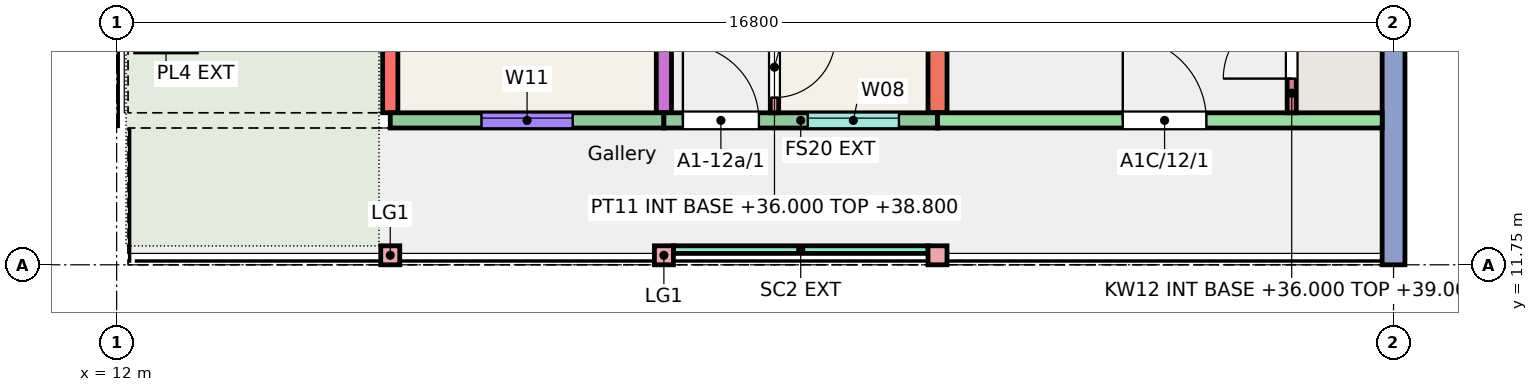
"""IFC4 building model, lengths in metres.
Left out: names, types, materials, properties, quantities, classifications, styles, units other than length and angle.
Written with IfcOpenShell. Run it as: python <this file> out.ifc"""

import sys

from ifc_helpers import new_model, si_unit, direction, frame, frame_2d, origin, origin_2d, place, context, subcontext, project, spatial, rectangle, extrude, element, fill, save


model = new_model("IFC4")
c1 = context("Model", 3, precision=1e-05, world=origin(), true_north=direction((0.0, 1.0)))
c2 = subcontext(c1, "Body", "Model", "MODEL_VIEW")
j1 = project(units=[si_unit("LENGTHUNIT", "METRE"), si_unit("PLANEANGLEUNIT", "RADIAN")], contexts=[c1])
p1 = place(None, origin())
s1 = spatial("IfcSite", under=j1, at=p1, CompositionType="ELEMENT")
p2 = place(p1, origin())
s2 = spatial("IfcBuilding", under=s1, at=p2, CompositionType="ELEMENT")
p3 = place(p2, frame((0.0, 0.0, 36.0)))
s3 = spatial("IfcBuildingStorey", under=s2, at=p3, CompositionType="ELEMENT", Elevation=36.0)
p4 = place(p3, frame((15.6, 13.75, 0.0), z_axis=(0.0, 0.0, 1.0), x_axis=(0.0, 1.0, 0.0)))
e1 = element("IfcWall", 1, at=p4, inside=s3, PredefinedType="SHEAR", context=c2, shape_type="SweptSolid", body=[
    extrude(rectangle(XDim=9.0, YDim=0.2, at=frame_2d((4.5, 0.0))), origin(), (0.0, 0.0, 1.0), 3.0),
])
p5 = place(p4, frame((1.45, 0.0, 0.9)))
e2 = element("IfcOpeningElement", 2, at=p5, cuts=e1, PredefinedType="OPENING", context=c2, shape_type="SweptSolid", body=[
    extrude(rectangle(XDim=1.5, YDim=1.5, at=frame_2d((0.75, 0.75))), frame((0.0, 0.11, 0.0), z_axis=(0.0, -1.0, 0.0), x_axis=(1.0, 0.0, 0.0)), (0.0, 0.0, 1.0), 0.22),
])
p6 = place(p4, frame((7.577, 0.0, 0.9)))
e3 = element("IfcOpeningElement", 3, at=p6, cuts=e1, PredefinedType="OPENING", context=c2, shape_type="SweptSolid", body=[
    extrude(rectangle(XDim=1.2, YDim=1.5, at=frame_2d((0.6, 0.75))), frame((0.0, 0.11, 0.0), z_axis=(0.0, -1.0, 0.0), x_axis=(1.0, 0.0, 0.0)), (0.0, 0.0, 1.0), 0.22),
])
p7 = place(p4, frame((6.255, 0.0, 0.0)))
e4 = element("IfcOpeningElement", 4, at=p7, cuts=e1, PredefinedType="OPENING", context=c2, shape_type="SweptSolid", body=[
    extrude(rectangle(XDim=1.0, YDim=2.1, at=frame_2d((0.5, 1.05))), frame((0.0, 0.11, 0.0), z_axis=(0.0, -1.0, 0.0), x_axis=(1.0, 0.0, 0.0)), (0.0, 0.0, 1.0), 0.22),
])
p8 = place(p3, frame((19.2, 13.75, 0.0), z_axis=(0.0, 0.0, 1.0), x_axis=(0.0, 1.0, 0.0)))
e5 = element("IfcWall", 5, at=p8, inside=s3, PredefinedType="SHEAR", context=c2, shape_type="SweptSolid", body=[
    extrude(rectangle(XDim=9.0, YDim=0.2, at=frame_2d((4.5, 0.0))), origin(), (0.0, 0.0, 1.0), 3.0),
])
p9 = place(p8, frame((2.4, 0.0, 0.0)))
e6 = element("IfcOpeningElement", 6, at=p9, cuts=e5, PredefinedType="OPENING", context=c2, shape_type="SweptSolid", body=[
    extrude(rectangle(XDim=1.2, YDim=2.1, at=frame_2d((0.6, 1.05))), frame((0.0, 0.11, 0.0), z_axis=(0.0, -1.0, 0.0), x_axis=(1.0, 0.0, 0.0)), (0.0, 0.0, 1.0), 0.22),
])
p10 = place(p8, frame((6.4, 0.0, 0.0)))
e7 = element("IfcOpeningElement", 7, at=p10, cuts=e5, PredefinedType="OPENING", context=c2, shape_type="SweptSolid", body=[
    extrude(rectangle(XDim=1.2, YDim=2.1, at=frame_2d((0.6, 1.05))), frame((0.0, 0.11, 0.0), z_axis=(0.0, -1.0, 0.0), x_axis=(1.0, 0.0, 0.0)), (0.0, 0.0, 1.0), 0.22),
])
p11 = place(p3, frame((22.8, 13.75, 0.0), z_axis=(0.0, 0.0, 1.0), x_axis=(0.0, 1.0, 0.0)))
e8 = element("IfcWall", 8, at=p11, inside=s3, PredefinedType="SHEAR", context=c2, shape_type="SweptSolid", body=[
    extrude(rectangle(XDim=9.0, YDim=0.25, at=frame_2d((4.5, 0.0))), origin(), (0.0, 0.0, 1.0), 3.0),
])
p12 = place(p3, frame((28.8, 11.75, 0.0), z_axis=(0.0, 0.0, 1.0), x_axis=(0.0, 1.0, 0.0)))
e9 = element("IfcWall", 9, at=p12, inside=s3, PredefinedType="SHEAR", context=c2, shape_type="SweptSolid", body=[
    extrude(rectangle(XDim=11.0, YDim=0.3, at=frame_2d((5.5, 0.0))), origin(), (0.0, 0.0, 1.0), 3.0),
])
p13 = place(p3, frame((15.6, 13.65, 0.0), z_axis=(0.0, 0.0, 1.0), x_axis=(1.0, 0.0, 0.0)))
e10 = element("IfcWall", 10, at=p13, inside=s3, PredefinedType="SOLIDWALL", context=c2, shape_type="SweptSolid", body=[
    extrude(rectangle(XDim=3.6, YDim=0.2, at=frame_2d((1.8, 0.0))), origin(), (0.0, 0.0, 1.0), 3.0),
])
p14 = place(p13, frame((1.2, 0.0, 0.8)))
e11 = element("IfcOpeningElement", 11, at=p14, cuts=e10, PredefinedType="OPENING", context=c2, shape_type="SweptSolid", body=[
    extrude(rectangle(XDim=1.2, YDim=1.6, at=frame_2d((0.6, 0.8))), frame((0.0, 0.11, 0.0), z_axis=(0.0, -1.0, 0.0), x_axis=(1.0, 0.0, 0.0)), (0.0, 0.0, 1.0), 0.22),
])
p15 = place(p3, frame((19.2, 13.65, 0.0), z_axis=(0.0, 0.0, 1.0), x_axis=(1.0, 0.0, 0.0)))
e12 = element("IfcWall", 12, at=p15, inside=s3, PredefinedType="SOLIDWALL", context=c2, shape_type="SweptSolid", body=[
    extrude(rectangle(XDim=3.6, YDim=0.2, at=frame_2d((1.8, 0.0))), origin(), (0.0, 0.0, 1.0), 3.0),
])
p16 = place(p15, frame((1.893, 0.0, 1.1)))
e13 = element("IfcOpeningElement", 13, at=p16, cuts=e12, PredefinedType="OPENING", context=c2, shape_type="SweptSolid", body=[
    extrude(rectangle(XDim=1.2, YDim=1.3, at=frame_2d((0.6, 0.65))), frame((0.0, 0.11, 0.0), z_axis=(0.0, -1.0, 0.0), x_axis=(1.0, 0.0, 0.0)), (0.0, 0.0, 1.0), 0.22),
])
p17 = place(p15, frame((0.25, 0.0, 0.0)))
e14 = element("IfcOpeningElement", 14, at=p17, cuts=e12, PredefinedType="OPENING", context=c2, shape_type="SweptSolid", body=[
    extrude(rectangle(XDim=1.0, YDim=2.1, at=frame_2d((0.5, 1.05))), frame((0.0, 0.11, 0.0), z_axis=(0.0, -1.0, 0.0), x_axis=(1.0, 0.0, 0.0)), (0.0, 0.0, 1.0), 0.22),
])
p18 = place(p3, frame((22.8, 13.65, 0.0), z_axis=(0.0, 0.0, 1.0), x_axis=(1.0, 0.0, 0.0)))
e15 = element("IfcWall", 15, at=p18, inside=s3, PredefinedType="SHEAR", context=c2, shape_type="SweptSolid", body=[
    extrude(rectangle(XDim=5.85, YDim=0.2, at=frame_2d((2.925, 0.0))), origin(), (0.0, 0.0, 1.0), 3.0),
])
p19 = place(p18, frame((2.438, 0.0, 0.0)))
e16 = element("IfcOpeningElement", 16, at=p19, cuts=e15, PredefinedType="OPENING", context=c2, shape_type="SweptSolid", body=[
    extrude(rectangle(XDim=1.1, YDim=2.1, at=frame_2d((0.55, 1.05))), frame((0.0, 0.11, 0.0), z_axis=(0.0, -1.0, 0.0), x_axis=(1.0, 0.0, 0.0)), (0.0, 0.0, 1.0), 0.22),
])
p20 = place(p3, frame((27.46, 13.75, 0.0), z_axis=(0.0, 0.0, 1.0), x_axis=(0.0, 1.0, 0.0)))
e17 = element("IfcWall", 17, at=p20, inside=s3, PredefinedType="SHEAR", context=c2, shape_type="SweptSolid", body=[
    extrude(rectangle(XDim=1.72, YDim=0.12, at=frame_2d((0.86, 0.0))), origin(), (0.0, 0.0, 1.0), 3.0),
])
p21 = place(p20, frame((0.45, 0.0, 0.0)))
e18 = element("IfcOpeningElement", 18, at=p21, cuts=e17, PredefinedType="OPENING", context=c2, shape_type="SweptSolid", body=[
    extrude(rectangle(XDim=0.9, YDim=2.1, at=frame_2d((0.45, 1.05))), frame((0.0, 0.07, 0.0), z_axis=(0.0, -1.0, 0.0), x_axis=(1.0, 0.0, 0.0)), (0.0, 0.0, 1.0), 0.14),
])
for number, where, z_axis, x_axis in (
    (19, (15.6, 11.875, 0.0), (0.0, 0.0, 1.0), (1.0, 0.0, 0.0)),
    (20, (19.2, 11.875, 0.0), (0.0, 0.0, 1.0), (1.0, 0.0, 0.0)),
    (21, (22.8, 11.875, 0.0), (0.0, 0.0, 1.0), (1.0, 0.0, 0.0)),
):
    element("IfcColumn", number, at=place(p3, frame(where, z_axis=z_axis, x_axis=x_axis)), inside=s3, PredefinedType="COLUMN", context=c2, shape_type="SweptSolid", body=[
        extrude(rectangle(XDim=0.25, YDim=0.25, at=origin_2d()), origin(), (0.0, 0.0, 1.0), 3.0),
    ])
p22 = place(p3, frame((12.25, 14.65, 0.01), z_axis=(0.0, 0.0, 1.0), x_axis=(1.0, 0.0, 0.0)))
e22 = element("IfcWall", 22, at=p22, inside=s3, PredefinedType="SOLIDWALL", context=c2, shape_type="SweptSolid", body=[
    extrude(rectangle(XDim=0.8, YDim=0.2, at=frame_2d((0.4, 0.0))), origin(), (0.0, 0.0, 1.0), 0.45),
])
p23 = place(p3, frame((19.325, 11.95, 0.0), z_axis=(0.0, 0.0, 1.0), x_axis=(1.0, 0.0, 0.0)))
e23 = element("IfcWall", 23, at=p23, inside=s3, PredefinedType="SOLIDWALL", context=c2, shape_type="SweptSolid", body=[
    extrude(rectangle(XDim=3.35, YDim=0.1, at=frame_2d((1.675, 0.0))), origin(), (0.0, 0.0, 1.0), 2.45),
])
p24 = place(p3, frame((20.655, 13.75, 0.0), z_axis=(0.0, 0.0, 1.0), x_axis=(0.0, 1.0, 0.0)))
e24 = element("IfcWall", 24, at=p24, inside=s3, PredefinedType="PARTITIONING", context=c2, shape_type="SweptSolid", body=[
    extrude(rectangle(XDim=4.5, YDim=0.11, at=frame_2d((2.25, 0.0))), origin(), (0.0, 0.0, 1.0), 2.8),
])
p25 = place(p24, frame((0.2, 0.0, 0.0)))
e25 = element("IfcOpeningElement", 25, at=p25, cuts=e24, PredefinedType="OPENING", context=c2, shape_type="SweptSolid", body=[
    extrude(rectangle(XDim=0.8, YDim=2.1, at=frame_2d((0.4, 1.05))), frame((0.0, 0.065, 0.0), z_axis=(0.0, -1.0, 0.0), x_axis=(1.0, 0.0, 0.0)), (0.0, 0.0, 1.0), 0.13),
])
p26 = place(p24, frame((3.55, 0.0, 0.0)))
e26 = element("IfcOpeningElement", 26, at=p26, cuts=e24, PredefinedType="OPENING", context=c2, shape_type="SweptSolid", body=[
    extrude(rectangle(XDim=0.8, YDim=2.1, at=frame_2d((0.4, 1.05))), frame((0.0, 0.065, 0.0), z_axis=(0.0, -1.0, 0.0), x_axis=(1.0, 0.0, 0.0)), (0.0, 0.0, 1.0), 0.13),
])
p27 = place(p14, origin())
e27 = element("IfcWindow", 27, at=p27, inside=s3, PartitioningType="SINGLE_PANEL", PredefinedType="WINDOW", context=c2, shape_type="SweptSolid", body=[
    extrude(rectangle(XDim=1.2, YDim=1.6, at=frame_2d((0.6, 0.8))), frame((0.0, 0.06, 0.0), z_axis=(0.0, -1.0, 0.0), x_axis=(1.0, 0.0, 0.0)), (0.0, 0.0, 1.0), 0.06),
])
fill(e11, e27)
p28 = place(p16, origin())
e28 = element("IfcWindow", 28, at=p28, inside=s3, PartitioningType="SINGLE_PANEL", PredefinedType="WINDOW", context=c2, shape_type="SweptSolid", body=[
    extrude(rectangle(XDim=1.2, YDim=1.3, at=frame_2d((0.6, 0.65))), frame((0.0, 0.06, 0.0), z_axis=(0.0, -1.0, 0.0), x_axis=(1.0, 0.0, 0.0)), (0.0, 0.0, 1.0), 0.06),
])
fill(e13, e28)
p29 = place(p17, origin())
e29 = element("IfcDoor", 29, at=p29, inside=s3, OperationType="SINGLE_SWING_LEFT", PredefinedType="DOOR", context=c2, shape_type="SweptSolid", body=[
    extrude(rectangle(XDim=1.0, YDim=2.1, at=frame_2d((0.5, 1.05))), frame((0.0, 0.025, 0.0), z_axis=(0.0, -1.0, 0.0), x_axis=(1.0, 0.0, 0.0)), (0.0, 0.0, 1.0), 0.05),
])
fill(e14, e29)
p30 = place(p25, origin())
e30 = element("IfcDoor", 30, at=p30, inside=s3, OperationType="SINGLE_SWING_RIGHT", PredefinedType="DOOR", context=c2, shape_type="SweptSolid", body=[
    extrude(rectangle(XDim=0.8, YDim=2.1, at=frame_2d((0.4, 1.05))), frame((0.0, 0.025, 0.0), z_axis=(0.0, -1.0, 0.0), x_axis=(1.0, 0.0, 0.0)), (0.0, 0.0, 1.0), 0.05),
])
fill(e25, e30)
p31 = place(p19, origin())
e31 = element("IfcDoor", 31, at=p31, inside=s3, OperationType="SINGLE_SWING_LEFT", PredefinedType="DOOR", context=c2, shape_type="SweptSolid", body=[
    extrude(rectangle(XDim=1.1, YDim=2.1, at=frame_2d((0.55, 1.05))), frame((0.0, 0.025, 0.0), z_axis=(0.0, -1.0, 0.0), x_axis=(1.0, 0.0, 0.0)), (0.0, 0.0, 1.0), 0.05),
])
fill(e16, e31)
p32 = place(p21, origin())
e32 = element("IfcDoor", 32, at=p32, inside=s3, OperationType="SINGLE_SWING_LEFT", PredefinedType="DOOR", context=c2, shape_type="SweptSolid", body=[
    extrude(rectangle(XDim=0.9, YDim=2.1, at=frame_2d((0.45, 1.05))), frame((0.0, 0.025, 0.0), z_axis=(0.0, -1.0, 0.0), x_axis=(1.0, 0.0, 0.0)), (0.0, 0.0, 1.0), 0.05),
])
fill(e18, e32)
save(model, sys.argv[1])
